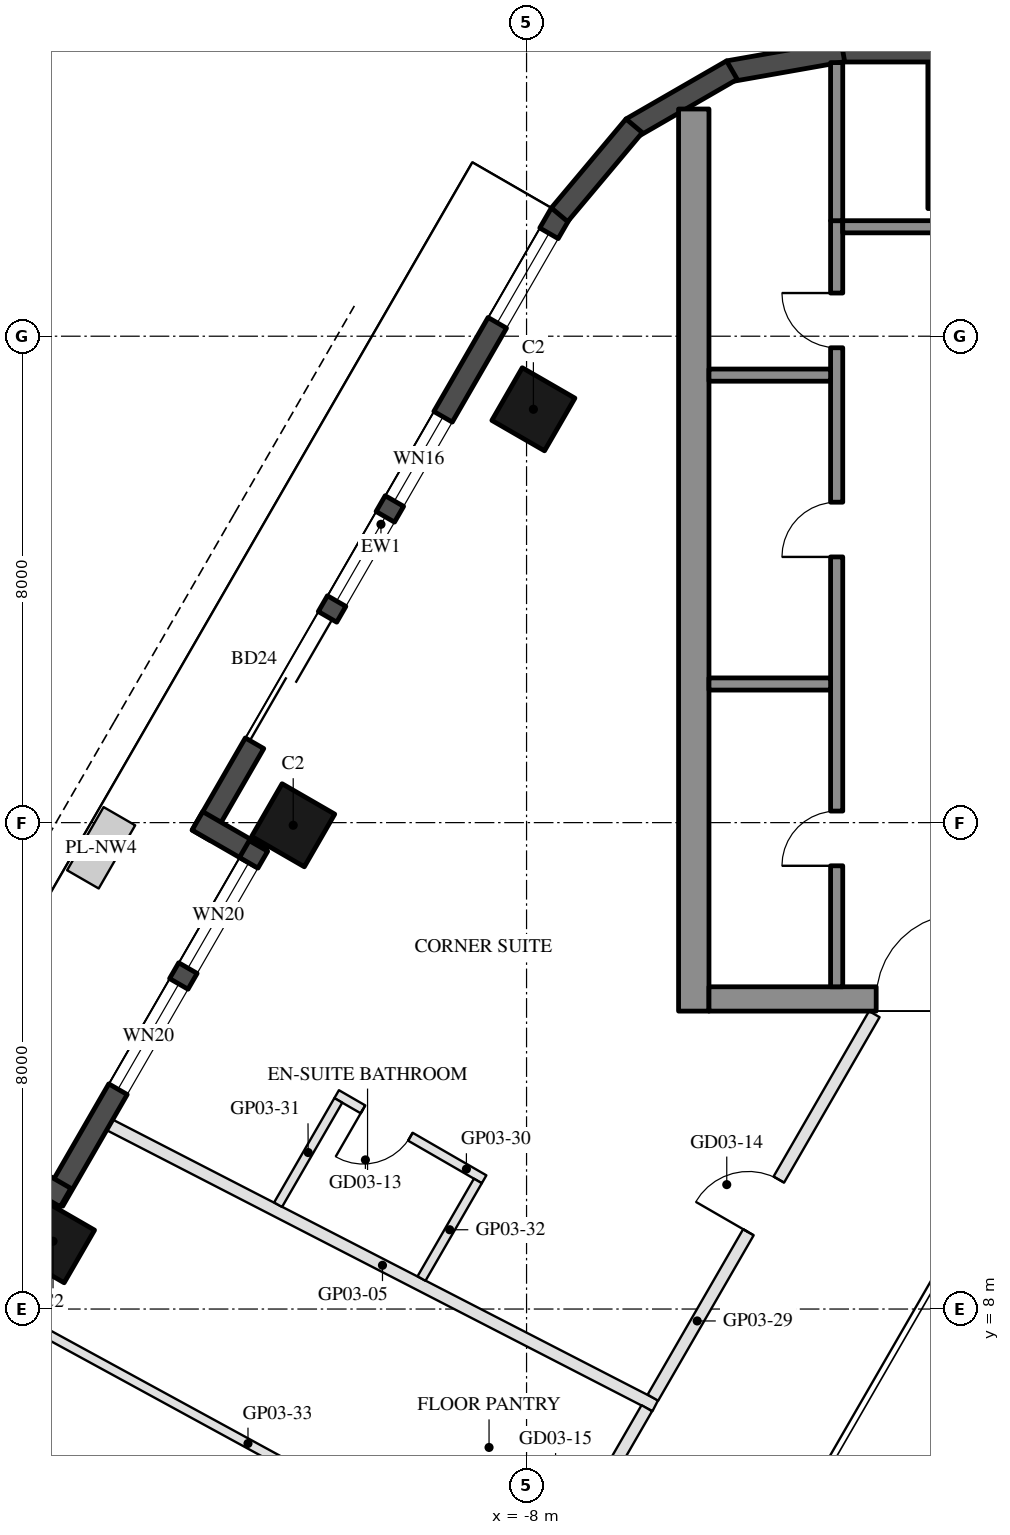
"""IFC4 building model, lengths in metres.
Left out: names, types, materials, properties, quantities, classifications, styles, units other than length and angle.
Written with IfcOpenShell. Run it as: python <this file> out.ifc"""

import sys

from ifc_helpers import new_model, si_unit, direction, frame, frame_2d, origin, origin_2d, place, context, subcontext, project, spatial, rectangle, hollow_rectangle, extrude, element, fill, save


model = new_model("IFC4")
c1 = context("Model", 3, precision=1e-05, world=origin(), true_north=direction((0.0, 1.0)))
c2 = subcontext(c1, "Body", "Model", "MODEL_VIEW")
j1 = project(units=[si_unit("LENGTHUNIT", "METRE"), si_unit("PLANEANGLEUNIT", "RADIAN")], contexts=[c1])
p1 = place(None, origin())
s1 = spatial("IfcSite", under=j1, at=p1, CompositionType="ELEMENT")
p2 = place(p1, origin())
s2 = spatial("IfcBuilding", under=s1, at=p2, CompositionType="ELEMENT")
p3 = place(p2, frame((0.0, 0.0, 68.7)))
s3 = spatial("IfcBuildingStorey", under=s2, at=p3, CompositionType="ELEMENT", Elevation=68.7)
for number, where, z_axis, x_axis in (
    (1, (-7.888, 22.798, 0.0), (0.0, 0.0, 1.0), (0.5, 0.866, 0.0)),
    (2, (-11.838, 15.957, 0.0), (0.0, 0.0, 1.0), (0.5, 0.866, 0.0)),
    (3, (-15.788, 9.115, 0.0), (0.0, 0.0, 1.0), (0.5, 0.866, 0.0)),
):
    element("IfcColumn", number, at=place(p3, frame(where, z_axis=z_axis, x_axis=x_axis)), inside=s3, PredefinedType="COLUMN", context=c2, shape_type="SweptSolid", body=[
        extrude(hollow_rectangle(XDim=1.0, YDim=1.0, WallThickness=0.045, at=origin_2d()), origin(), (0.0, 0.0, 1.0), 3.7),
    ])
p4 = place(p3, frame((0.0, 27.3, 0.0), z_axis=(0.0, 0.0, 1.0), x_axis=(1.0, 0.0, 0.0)))
e4 = element("IfcColumn", 4, at=p4, inside=s3, PredefinedType="COLUMN", context=c2, shape_type="SweptSolid", body=[
    extrude(hollow_rectangle(XDim=2.8, YDim=2.4, WallThickness=0.07, at=origin_2d()), origin(), (0.0, 0.0, 1.0), 3.7),
])
p5 = place(p3, frame((-7.441, 26.022, 0.0), z_axis=(0.0, 0.0, 1.0), x_axis=(-0.499992533062, -0.86602971478, 0.0)))
e5 = element("IfcWall", 5, at=p5, inside=s3, PredefinedType="SOLIDWALL", context=c2, shape_type="SweptSolid", body=[
    extrude(rectangle(XDim=11.816, YDim=0.35, at=frame_2d((5.908, 0.0))), origin(), (0.0, 0.0, 1.0), 3.55),
])
p6 = place(p5, frame((0.381, 0.0, 0.3)))
e6 = element("IfcOpeningElement", 6, at=p6, cuts=e5, PredefinedType="OPENING", context=c2, shape_type="SweptSolid", body=[
    extrude(rectangle(XDim=1.7, YDim=2.65, at=frame_2d((0.85, 1.325))), frame((0.0, 0.185, 0.0), z_axis=(0.0, -1.0, 0.0), x_axis=(1.0, 0.0, 0.0)), (0.0, 0.0, 1.0), 0.37),
])
p7 = place(p5, frame((7.666, 0.0, 0.0)))
e7 = element("IfcOpeningElement", 7, at=p7, cuts=e5, PredefinedType="OPENING", context=c2, shape_type="SweptSolid", body=[
    extrude(rectangle(XDim=2.4, YDim=2.4, at=frame_2d((1.2, 1.2))), frame((0.0, 0.185, 0.0), z_axis=(0.0, -1.0, 0.0), x_axis=(1.0, 0.0, 0.0)), (0.0, 0.0, 1.0), 0.37),
])
p8 = place(p5, frame((3.865, 0.0, 0.3)))
e8 = element("IfcOpeningElement", 8, at=p8, cuts=e5, PredefinedType="OPENING", context=c2, shape_type="SweptSolid", body=[
    extrude(rectangle(XDim=1.6, YDim=2.65, at=frame_2d((0.8, 1.325))), frame((0.0, 0.185, 0.0), z_axis=(0.0, -1.0, 0.0), x_axis=(1.0, 0.0, 0.0)), (0.0, 0.0, 1.0), 0.37),
])
p9 = place(p5, frame((5.765, 0.0, 0.3)))
e9 = element("IfcOpeningElement", 9, at=p9, cuts=e5, PredefinedType="OPENING", context=c2, shape_type="SweptSolid", body=[
    extrude(rectangle(XDim=1.6, YDim=2.65, at=frame_2d((0.8, 1.325))), frame((0.0, 0.185, 0.0), z_axis=(0.0, -1.0, 0.0), x_axis=(1.0, 0.0, 0.0)), (0.0, 0.0, 1.0), 0.37),
])
p10 = place(p3, frame((-13.413, 16.029, 0.0), z_axis=(0.0, 0.0, 1.0), x_axis=(0.866005645448, -0.500034220881, 0.0)))
e10 = element("IfcWall", 10, at=p10, inside=s3, PredefinedType="SOLIDWALL", context=c2, shape_type="SweptSolid", body=[
    extrude(rectangle(XDim=1.22, YDim=0.35, at=frame_2d((0.61, 0.0))), origin(), (0.0, 0.0, 1.0), 3.55),
])
p11 = place(p3, frame((-12.409, 15.617, 0.0), z_axis=(0.0, 0.0, 1.0), x_axis=(-0.500003597184, -0.866023326939, 0.0)))
e11 = element("IfcWall", 11, at=p11, inside=s3, PredefinedType="SOLIDWALL", context=c2, shape_type="SweptSolid", body=[
    extrude(rectangle(XDim=6.74, YDim=0.35, at=frame_2d((3.37, 0.0))), origin(), (0.0, 0.0, 1.0), 3.55),
])
p12 = place(p11, frame((0.32, 0.0, 0.3)))
e12 = element("IfcOpeningElement", 12, at=p12, cuts=e11, PredefinedType="OPENING", context=c2, shape_type="SweptSolid", body=[
    extrude(rectangle(XDim=2.0, YDim=2.65, at=frame_2d((1.0, 1.325))), frame((0.0, 0.185, 0.0), z_axis=(0.0, -1.0, 0.0), x_axis=(1.0, 0.0, 0.0)), (0.0, 0.0, 1.0), 0.37),
])
p13 = place(p11, frame((2.62, 0.0, 0.3)))
e13 = element("IfcOpeningElement", 13, at=p13, cuts=e11, PredefinedType="OPENING", context=c2, shape_type="SweptSolid", body=[
    extrude(rectangle(XDim=2.0, YDim=2.65, at=frame_2d((1.0, 1.325))), frame((0.0, 0.185, 0.0), z_axis=(0.0, -1.0, 0.0), x_axis=(1.0, 0.0, 0.0)), (0.0, 0.0, 1.0), 0.37),
])
p14 = place(p3, frame((-15.581, 9.833, 0.0), z_axis=(0.0, 0.0, 1.0), x_axis=(-0.866055662726, 0.499947586314, 0.0)))
e14 = element("IfcWall", 14, at=p14, inside=s3, PredefinedType="SOLIDWALL", context=c2, shape_type="SweptSolid", body=[
    extrude(rectangle(XDim=1.22, YDim=0.35, at=frame_2d((0.61, 0.0))), origin(), (0.0, 0.0, 1.0), 3.55),
])
p15 = place(p3, frame((2.829, 28.685, 0.0), z_axis=(0.0, 0.0, 1.0), x_axis=(-1.0, 0.0, 0.0)))
e15 = element("IfcWall", 15, at=p15, inside=s3, PredefinedType="SOLIDWALL", context=c2, shape_type="SweptSolid", body=[
    extrude(rectangle(XDim=5.658, YDim=0.35, at=frame_2d((2.829, 0.0))), origin(), (0.0, 0.0, 1.0), 3.55),
])
for number, where, z_axis, x_axis in (
    (16, (-2.799, 28.688, 0.0), (0.0, 0.0, 1.0), (-0.985, -0.174, 0.0)),
    (17, (-4.623, 28.377, 0.0), (0.0, 0.0, 1.0), (-0.866, -0.5, 0.0)),
):
    element("IfcWall", number, at=place(p3, frame(where, z_axis=z_axis, x_axis=x_axis)), inside=s3, PredefinedType="SOLIDWALL", context=c2, shape_type="SweptSolid", body=[
        extrude(rectangle(XDim=1.91, YDim=0.35, at=frame_2d((0.955, 0.0))), origin(), (0.0, 0.0, 1.0), 3.55),
    ])
p16 = place(p3, frame((-6.23, 27.461, 0.0), z_axis=(0.0, 0.0, 1.0), x_axis=(-0.642808304945, -0.766027077259, 0.0)))
e18 = element("IfcWall", 18, at=p16, inside=s3, PredefinedType="SOLIDWALL", context=c2, shape_type="SweptSolid", body=[
    extrude(rectangle(XDim=1.91, YDim=0.35, at=frame_2d((0.955, 0.0))), origin(), (0.0, 0.0, 1.0), 3.55),
])
p17 = place(p3, frame((-5.25, 12.9, 0.0), z_axis=(0.0, 0.0, 1.0), x_axis=(0.0, 1.0, 0.0)))
e19 = element("IfcWall", 19, at=p17, inside=s3, PredefinedType="SHEAR", context=c2, shape_type="SweptSolid", body=[
    extrude(rectangle(XDim=14.837, YDim=0.5, at=frame_2d((7.418, 0.0))), origin(), (0.0, 0.0, 1.0), 3.5),
])
p18 = place(p3, frame((5.0, 13.1, 0.0), z_axis=(0.0, 0.0, 1.0), x_axis=(-1.0, 0.0, 0.0)))
e20 = element("IfcWall", 20, at=p18, inside=s3, PredefinedType="SHEAR", context=c2, shape_type="SweptSolid", body=[
    extrude(rectangle(XDim=10.0, YDim=0.4, at=frame_2d((5.0, 0.0))), origin(), (0.0, 0.0, 1.0), 3.5),
])
p19 = place(p18, frame((3.55, 0.0, 0.0)))
e21 = element("IfcOpeningElement", 21, at=p19, cuts=e20, PredefinedType="OPENING", context=c2, shape_type="SweptSolid", body=[
    extrude(rectangle(XDim=1.1, YDim=2.1, at=frame_2d((0.55, 1.05))), frame((0.0, 0.21, 0.0), z_axis=(0.0, -1.0, 0.0), x_axis=(1.0, 0.0, 0.0)), (0.0, 0.0, 1.0), 0.42),
])
p20 = place(p18, frame((5.85, 0.0, 0.0)))
e22 = element("IfcOpeningElement", 22, at=p20, cuts=e20, PredefinedType="OPENING", context=c2, shape_type="SweptSolid", body=[
    extrude(rectangle(XDim=1.4, YDim=2.1, at=frame_2d((0.7, 1.05))), frame((0.0, 0.21, 0.0), z_axis=(0.0, -1.0, 0.0), x_axis=(1.0, 0.0, 0.0)), (0.0, 0.0, 1.0), 0.42),
])
p21 = place(p3, frame((-2.9, 13.3, 0.0), z_axis=(0.0, 0.0, 1.0), x_axis=(0.0, 1.0, 0.0)))
e23 = element("IfcWall", 23, at=p21, inside=s3, PredefinedType="SHEAR", context=c2, shape_type="SweptSolid", body=[
    extrude(rectangle(XDim=12.6, YDim=0.2, at=frame_2d((6.3, 0.0))), origin(), (0.0, 0.0, 1.0), 3.5),
])
p22 = place(p21, frame((1.99, 0.0, 0.0)))
e24 = element("IfcOpeningElement", 24, at=p22, cuts=e23, PredefinedType="OPENING", context=c2, shape_type="SweptSolid", body=[
    extrude(rectangle(XDim=0.9, YDim=2.1, at=frame_2d((0.45, 1.05))), frame((0.0, 0.11, 0.0), z_axis=(0.0, -1.0, 0.0), x_axis=(1.0, 0.0, 0.0)), (0.0, 0.0, 1.0), 0.22),
])
p23 = place(p21, frame((7.07, 0.0, 0.0)))
e25 = element("IfcOpeningElement", 25, at=p23, cuts=e23, PredefinedType="OPENING", context=c2, shape_type="SweptSolid", body=[
    extrude(rectangle(XDim=0.9, YDim=2.1, at=frame_2d((0.45, 1.05))), frame((0.0, 0.11, 0.0), z_axis=(0.0, -1.0, 0.0), x_axis=(1.0, 0.0, 0.0)), (0.0, 0.0, 1.0), 0.22),
])
p24 = place(p21, frame((10.51, 0.0, 0.0)))
e26 = element("IfcOpeningElement", 26, at=p24, cuts=e23, PredefinedType="OPENING", context=c2, shape_type="SweptSolid", body=[
    extrude(rectangle(XDim=0.9, YDim=2.1, at=frame_2d((0.45, 1.05))), frame((0.0, 0.11, 0.0), z_axis=(0.0, -1.0, 0.0), x_axis=(1.0, 0.0, 0.0)), (0.0, 0.0, 1.0), 0.22),
])
p25 = place(p3, frame((-0.4, 25.8, 0.0), z_axis=(0.0, 0.0, 1.0), x_axis=(-1.0, 0.0, 0.0)))
e27 = element("IfcWall", 27, at=p25, inside=s3, PredefinedType="SHEAR", context=c2, shape_type="SweptSolid", body=[
    extrude(rectangle(XDim=2.4, YDim=0.2, at=frame_2d((1.2, 0.0))), origin(), (0.0, 0.0, 1.0), 3.5),
])
for number, where, z_axis, x_axis in (
    (28, (-3.0, 18.28, 0.0), (0.0, 0.0, 1.0), (-1.0, 0.0, 0.0)),
    (29, (-3.0, 23.36, 0.0), (0.0, 0.0, 1.0), (-1.0, 0.0, 0.0)),
):
    element("IfcWall", number, at=place(p3, frame(where, z_axis=z_axis, x_axis=x_axis)), inside=s3, PredefinedType="SHEAR", context=c2, shape_type="SweptSolid", body=[
        extrude(rectangle(XDim=2.0, YDim=0.2, at=frame_2d((1.0, 0.0))), origin(), (0.0, 0.0, 1.0), 3.5),
    ])
p26 = place(p3, frame((-2.9, 25.9, 0.0), z_axis=(0.0, 0.0, 1.0), x_axis=(0.0, 1.0, 0.0)))
e30 = element("IfcWall", 30, at=p26, inside=s3, PredefinedType="SHEAR", context=c2, shape_type="SweptSolid", body=[
    extrude(rectangle(XDim=2.6, YDim=0.2, at=frame_2d((1.3, 0.0))), origin(), (0.0, 0.0, 1.0), 3.5),
])
p27 = place(p3, frame((-14.856, 11.029, 0.0), z_axis=(0.0, 0.0, 1.0), x_axis=(0.889105841633, -0.457701652142, 0.0)))
e31 = element("IfcWall", 31, at=p27, inside=s3, PredefinedType="PARTITIONING", context=c2, shape_type="SweptSolid", body=[
    extrude(rectangle(XDim=10.092, YDim=0.2, at=frame_2d((5.046, 0.0))), origin(), (0.0, 0.0, 1.0), 2.96),
])
p28 = place(p3, frame((-5.922, 6.542, 0.0), z_axis=(0.0, 0.0, 1.0), x_axis=(0.499989401968, 0.866031522475, 0.0)))
e32 = element("IfcWall", 32, at=p28, inside=s3, PredefinedType="PARTITIONING", context=c2, shape_type="SweptSolid", body=[
    extrude(rectangle(XDim=7.283, YDim=0.2, at=frame_2d((3.642, 0.0))), origin(), (0.0, 0.0, 1.0), 2.95),
])
p29 = place(p28, frame((3.142, 0.0, 0.0)))
e33 = element("IfcOpeningElement", 33, at=p29, cuts=e32, PredefinedType="OPENING", context=c2, shape_type="SweptSolid", body=[
    extrude(rectangle(XDim=1.0, YDim=2.1, at=frame_2d((0.5, 1.05))), frame((0.0, 0.11, 0.0), z_axis=(0.0, -1.0, 0.0), x_axis=(1.0, 0.0, 0.0)), (0.0, 0.0, 1.0), 0.22),
])
p30 = place(p3, frame((-8.698, 10.134, 0.0), z_axis=(0.0, 0.0, 1.0), x_axis=(-0.866034573852, 0.49998411664, 0.0)))
e34 = element("IfcWall", 34, at=p30, inside=s3, PredefinedType="PARTITIONING", context=c2, shape_type="SweptSolid", body=[
    extrude(rectangle(XDim=2.8, YDim=0.15, at=frame_2d((1.4, 0.0))), origin(), (0.0, 0.0, 1.0), 3.55),
])
p31 = place(p30, frame((1.4, 0.0, 0.0)))
e35 = element("IfcOpeningElement", 35, at=p31, cuts=e34, PredefinedType="OPENING", context=c2, shape_type="SweptSolid", body=[
    extrude(rectangle(XDim=0.9, YDim=2.1, at=frame_2d((0.45, 1.05))), frame((0.0, 0.085, 0.0), z_axis=(0.0, -1.0, 0.0), x_axis=(1.0, 0.0, 0.0)), (0.0, 0.0, 1.0), 0.17),
])
p32 = place(p3, frame((-11.096, 11.432, 0.0), z_axis=(0.0, 0.0, 1.0), x_axis=(-0.500035331196, -0.866005004348, 0.0)))
e36 = element("IfcWall", 36, at=p32, inside=s3, PredefinedType="PARTITIONING", context=c2, shape_type="SweptSolid", body=[
    extrude(rectangle(XDim=1.981, YDim=0.15, at=frame_2d((0.991, 0.0))), origin(), (0.0, 0.0, 1.0), 2.95),
])
p33 = place(p3, frame((-8.801, 10.107, 0.0), z_axis=(0.0, 0.0, 1.0), x_axis=(-0.499992292652, -0.866029853578, 0.0)))
e37 = element("IfcWall", 37, at=p33, inside=s3, PredefinedType="PARTITIONING", context=c2, shape_type="SweptSolid", body=[
    extrude(rectangle(XDim=1.854, YDim=0.15, at=frame_2d((0.927, 0.0))), origin(), (0.0, 0.0, 1.0), 2.95),
])
p34 = place(p3, frame((-17.402, 8.419, 0.0), z_axis=(0.0, 0.0, 1.0), x_axis=(0.877831004422, -0.47897048727, 0.0)))
e38 = element("IfcWall", 38, at=p34, inside=s3, PredefinedType="PARTITIONING", context=c2, shape_type="SweptSolid", body=[
    extrude(rectangle(XDim=10.983, YDim=0.15, at=frame_2d((5.492, 0.0))), origin(), (0.0, 0.0, 1.0), 2.96),
])
p35 = place(p3, frame((-7.811, 3.271, 0.0), z_axis=(0.0, 0.0, 1.0), x_axis=(0.4999705729, 0.866042392862, 0.0)))
e39 = element("IfcWall", 39, at=p35, inside=s3, PredefinedType="PARTITIONING", context=c2, shape_type="SweptSolid", body=[
    extrude(rectangle(XDim=3.577, YDim=0.2, at=frame_2d((1.789, 0.0))), origin(), (0.0, 0.0, 1.0), 2.95),
])
p36 = place(p35, frame((1.339, 0.0, 0.0)))
e40 = element("IfcOpeningElement", 40, at=p36, cuts=e39, PredefinedType="OPENING", context=c2, shape_type="SweptSolid", body=[
    extrude(rectangle(XDim=0.9, YDim=2.1, at=frame_2d((0.45, 1.05))), frame((0.0, 0.11, 0.0), z_axis=(0.0, -1.0, 0.0), x_axis=(1.0, 0.0, 0.0)), (0.0, 0.0, 1.0), 0.22),
])
p37 = place(p6, origin())
e41 = element("IfcWindow", 41, at=p37, inside=s3, PartitioningType="SINGLE_PANEL", PredefinedType="WINDOW", context=c2, shape_type="SweptSolid", body=[
    extrude(rectangle(XDim=1.7, YDim=2.65, at=frame_2d((0.85, 1.325))), frame((0.0, 0.03, 0.0), z_axis=(0.0, -1.0, 0.0), x_axis=(1.0, 0.0, 0.0)), (0.0, 0.0, 1.0), 0.06),
])
fill(e6, e41)
p38 = place(p7, frame((2.4, 0.0, 0.0), z_axis=(0.0, 0.0, 1.0), x_axis=(-1.0, 0.0, 0.0)))
e42 = element("IfcDoor", 42, at=p38, inside=s3, OperationType="SLIDING_TO_LEFT", PredefinedType="DOOR", context=c2, shape_type="SweptSolid", body=[
    extrude(rectangle(XDim=2.4, YDim=2.4, at=frame_2d((1.2, 1.2))), frame((0.0, 0.025, 0.0), z_axis=(0.0, -1.0, 0.0), x_axis=(1.0, 0.0, 0.0)), (0.0, 0.0, 1.0), 0.05),
])
fill(e7, e42)
p39 = place(p8, origin())
e43 = element("IfcWindow", 43, at=p39, inside=s3, PartitioningType="SINGLE_PANEL", PredefinedType="WINDOW", context=c2, shape_type="SweptSolid", body=[
    extrude(rectangle(XDim=1.6, YDim=2.65, at=frame_2d((0.8, 1.325))), frame((0.0, 0.03, 0.0), z_axis=(0.0, -1.0, 0.0), x_axis=(1.0, 0.0, 0.0)), (0.0, 0.0, 1.0), 0.06),
])
fill(e8, e43)
p40 = place(p9, origin())
e44 = element("IfcWindow", 44, at=p40, inside=s3, PartitioningType="SINGLE_PANEL", PredefinedType="WINDOW", context=c2, shape_type="SweptSolid", body=[
    extrude(rectangle(XDim=1.6, YDim=2.65, at=frame_2d((0.8, 1.325))), frame((0.0, 0.03, 0.0), z_axis=(0.0, -1.0, 0.0), x_axis=(1.0, 0.0, 0.0)), (0.0, 0.0, 1.0), 0.06),
])
fill(e9, e44)
p41 = place(p12, origin())
e45 = element("IfcWindow", 45, at=p41, inside=s3, PartitioningType="SINGLE_PANEL", PredefinedType="WINDOW", context=c2, shape_type="SweptSolid", body=[
    extrude(rectangle(XDim=2.0, YDim=2.65, at=frame_2d((1.0, 1.325))), frame((0.0, 0.03, 0.0), z_axis=(0.0, -1.0, 0.0), x_axis=(1.0, 0.0, 0.0)), (0.0, 0.0, 1.0), 0.06),
])
fill(e12, e45)
p42 = place(p13, origin())
e46 = element("IfcWindow", 46, at=p42, inside=s3, PartitioningType="SINGLE_PANEL", PredefinedType="WINDOW", context=c2, shape_type="SweptSolid", body=[
    extrude(rectangle(XDim=2.0, YDim=2.65, at=frame_2d((1.0, 1.325))), frame((0.0, 0.03, 0.0), z_axis=(0.0, -1.0, 0.0), x_axis=(1.0, 0.0, 0.0)), (0.0, 0.0, 1.0), 0.06),
])
fill(e13, e46)
p43 = place(p22, origin())
e47 = element("IfcDoor", 47, at=p43, inside=s3, OperationType="SINGLE_SWING_LEFT", PredefinedType="DOOR", context=c2, shape_type="SweptSolid", body=[
    extrude(rectangle(XDim=0.9, YDim=2.1, at=frame_2d((0.45, 1.05))), frame((0.0, 0.025, 0.0), z_axis=(0.0, -1.0, 0.0), x_axis=(1.0, 0.0, 0.0)), (0.0, 0.0, 1.0), 0.05),
])
fill(e24, e47)
p44 = place(p23, origin())
e48 = element("IfcDoor", 48, at=p44, inside=s3, OperationType="SINGLE_SWING_LEFT", PredefinedType="DOOR", context=c2, shape_type="SweptSolid", body=[
    extrude(rectangle(XDim=0.9, YDim=2.1, at=frame_2d((0.45, 1.05))), frame((0.0, 0.025, 0.0), z_axis=(0.0, -1.0, 0.0), x_axis=(1.0, 0.0, 0.0)), (0.0, 0.0, 1.0), 0.05),
])
fill(e25, e48)
p45 = place(p24, origin())
e49 = element("IfcDoor", 49, at=p45, inside=s3, OperationType="SINGLE_SWING_RIGHT", PredefinedType="DOOR", context=c2, shape_type="SweptSolid", body=[
    extrude(rectangle(XDim=0.9, YDim=2.1, at=frame_2d((0.45, 1.05))), frame((0.0, 0.025, 0.0), z_axis=(0.0, -1.0, 0.0), x_axis=(1.0, 0.0, 0.0)), (0.0, 0.0, 1.0), 0.05),
])
fill(e26, e49)
p46 = place(p20, frame((1.4, 0.0, 0.0), z_axis=(0.0, 0.0, 1.0), x_axis=(-1.0, 0.0, 0.0)))
e50 = element("IfcDoor", 50, at=p46, inside=s3, OperationType="DOUBLE_DOOR_SINGLE_SWING", PredefinedType="DOOR", context=c2, shape_type="SweptSolid", body=[
    extrude(rectangle(XDim=1.4, YDim=2.1, at=frame_2d((0.7, 1.05))), frame((0.0, 0.025, 0.0), z_axis=(0.0, -1.0, 0.0), x_axis=(1.0, 0.0, 0.0)), (0.0, 0.0, 1.0), 0.05),
])
fill(e22, e50)
p47 = place(p31, origin())
e51 = element("IfcDoor", 51, at=p47, inside=s3, OperationType="SINGLE_SWING_RIGHT", PredefinedType="DOOR", context=c2, shape_type="SweptSolid", body=[
    extrude(rectangle(XDim=0.9, YDim=2.1, at=frame_2d((0.45, 1.05))), frame((0.0, 0.025, 0.0), z_axis=(0.0, -1.0, 0.0), x_axis=(1.0, 0.0, 0.0)), (0.0, 0.0, 1.0), 0.05),
])
fill(e35, e51)
p48 = place(p29, origin())
e52 = element("IfcDoor", 52, at=p48, inside=s3, OperationType="SINGLE_SWING_LEFT", PredefinedType="DOOR", context=c2, shape_type="SweptSolid", body=[
    extrude(rectangle(XDim=1.0, YDim=2.1, at=frame_2d((0.5, 1.05))), frame((0.0, 0.025, 0.0), z_axis=(0.0, -1.0, 0.0), x_axis=(1.0, 0.0, 0.0)), (0.0, 0.0, 1.0), 0.05),
])
fill(e33, e52)
save(model, sys.argv[1])
